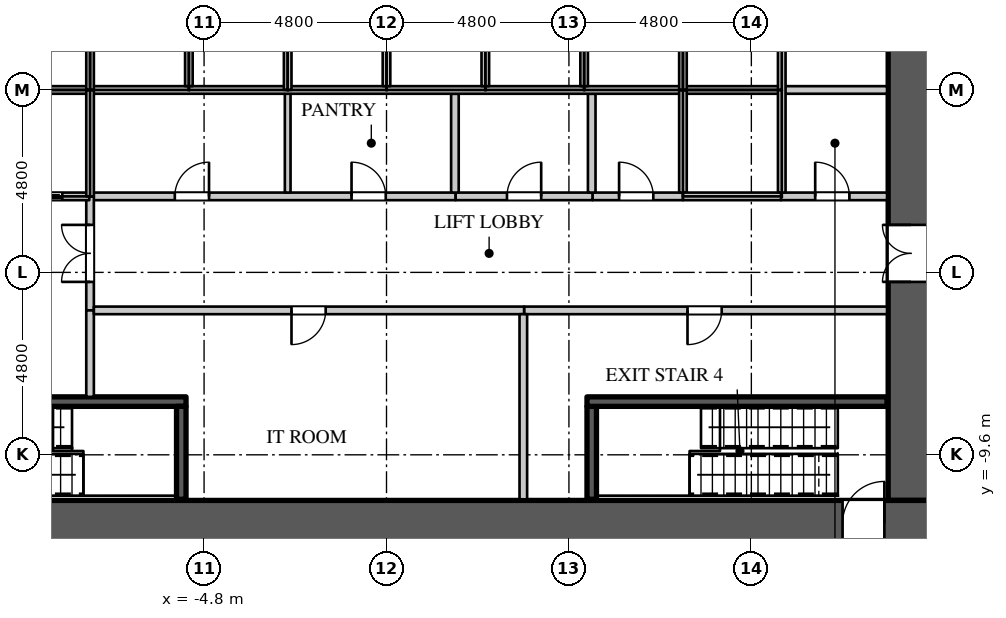
"""IFC4 building model, lengths in metres.
Left out: names, types, materials, properties, quantities, classifications, styles, units other than length and angle.
Written with IfcOpenShell. Run it as: python <this file> out.ifc"""

import sys

from ifc_helpers import new_model, si_unit, direction, frame, frame_2d, origin, place, context, subcontext, project, spatial, rectangle, extrude, element, fill, save


model = new_model("IFC4")
c1 = context("Model", 3, precision=1e-05, world=origin(), true_north=direction((0.0, 1.0)))
c2 = subcontext(c1, "Body", "Model", "MODEL_VIEW")
j1 = project(units=[si_unit("LENGTHUNIT", "METRE"), si_unit("PLANEANGLEUNIT", "RADIAN")], contexts=[c1])
p1 = place(None, origin())
s1 = spatial("IfcSite", under=j1, at=p1, CompositionType="ELEMENT")
p2 = place(p1, origin())
s2 = spatial("IfcBuilding", under=s1, at=p2, CompositionType="ELEMENT")
p3 = place(p2, frame((0.0, 0.0, 21.0)))
s3 = spatial("IfcBuildingStorey", under=s2, at=p3, CompositionType="ELEMENT", Elevation=21.0)
p4 = place(p3, frame((-14.4, -11.4, 0.0), z_axis=(0.0, 0.0, 1.0), x_axis=(1.0, 0.0, 0.0)))
e1 = element("IfcWall", 1, at=p4, inside=s3, PredefinedType="SHEAR", context=c2, shape_type="SweptSolid", body=[
    extrude(rectangle(XDim=28.8, YDim=1.2, at=frame_2d((14.4, 0.0))), origin(), (0.0, 0.0, 1.0), 4.5),
])
p5 = place(p4, frame((1.3, 0.0, 0.0)))
e2 = element("IfcOpeningElement", 2, at=p5, cuts=e1, PredefinedType="OPENING", context=c2, shape_type="SweptSolid", body=[
    extrude(rectangle(XDim=1.1, YDim=2.2, at=frame_2d((0.55, 1.1))), frame((0.0, 0.61, 0.0), z_axis=(0.0, -1.0, 0.0), x_axis=(1.0, 0.0, 0.0)), (0.0, 0.0, 1.0), 1.22),
])
p6 = place(p4, frame((26.4, 0.0, 0.0)))
e3 = element("IfcOpeningElement", 3, at=p6, cuts=e1, PredefinedType="OPENING", context=c2, shape_type="SweptSolid", body=[
    extrude(rectangle(XDim=1.1, YDim=2.2, at=frame_2d((0.55, 1.1))), frame((0.0, 0.61, 0.0), z_axis=(0.0, -1.0, 0.0), x_axis=(1.0, 0.0, 0.0)), (0.0, 0.0, 1.0), 1.22),
])
p7 = place(p3, frame((13.8, -10.8, 0.0), z_axis=(0.0, 0.0, 1.0), x_axis=(0.0, 1.0, 0.0)))
e4 = element("IfcWall", 4, at=p7, inside=s3, PredefinedType="SHEAR", context=c2, shape_type="SweptSolid", body=[
    extrude(rectangle(XDim=21.6, YDim=1.2, at=frame_2d((10.8, 0.0))), origin(), (0.0, 0.0, 1.0), 4.5),
])
p8 = place(p7, frame((14.35, 0.0, 0.0)))
e5 = element("IfcOpeningElement", 5, at=p8, cuts=e4, PredefinedType="OPENING", context=c2, shape_type="SweptSolid", body=[
    extrude(rectangle(XDim=1.5, YDim=2.4, at=frame_2d((0.75, 1.2))), frame((0.0, 0.61, 0.0), z_axis=(0.0, -1.0, 0.0), x_axis=(1.0, 0.0, 0.0)), (0.0, 0.0, 1.0), 1.22),
])
p9 = place(p7, frame((5.75, 0.0, 0.0)))
e6 = element("IfcOpeningElement", 6, at=p9, cuts=e4, PredefinedType="OPENING", context=c2, shape_type="SweptSolid", body=[
    extrude(rectangle(XDim=1.5, YDim=2.4, at=frame_2d((0.75, 1.2))), frame((0.0, 0.61, 0.0), z_axis=(0.0, -1.0, 0.0), x_axis=(1.0, 0.0, 0.0)), (0.0, 0.0, 1.0), 1.22),
])
p10 = place(p3, frame((-7.82, -2.8, 0.0), z_axis=(0.0, 0.0, 1.0), x_axis=(1.0, 0.0, 0.0)))
e7 = element("IfcWall", 7, at=p10, inside=s3, PredefinedType="PARTITIONING", context=c2, shape_type="SweptSolid", body=[
    extrude(rectangle(XDim=9.64, YDim=0.2, at=frame_2d((4.82, 0.0))), origin(), (0.0, 0.0, 1.0), 4.25),
])
p11 = place(p10, frame((2.25, 0.0, 0.0)))
e8 = element("IfcOpeningElement", 8, at=p11, cuts=e7, PredefinedType="OPENING", context=c2, shape_type="SweptSolid", body=[
    extrude(rectangle(XDim=0.9, YDim=2.2, at=frame_2d((0.45, 1.1))), frame((0.0, 0.11, 0.0), z_axis=(0.0, -1.0, 0.0), x_axis=(1.0, 0.0, 0.0)), (0.0, 0.0, 1.0), 0.22),
])
p12 = place(p10, frame((6.9, 0.0, 0.0)))
e9 = element("IfcOpeningElement", 9, at=p12, cuts=e7, PredefinedType="OPENING", context=c2, shape_type="SweptSolid", body=[
    extrude(rectangle(XDim=0.9, YDim=2.2, at=frame_2d((0.45, 1.1))), frame((0.0, 0.11, 0.0), z_axis=(0.0, -1.0, 0.0), x_axis=(1.0, 0.0, 0.0)), (0.0, 0.0, 1.0), 0.22),
])
p13 = place(p3, frame((-7.8, -5.8, 0.0), z_axis=(0.0, 0.0, 1.0), x_axis=(0.0, 1.0, 0.0)))
e10 = element("IfcWall", 10, at=p13, inside=s3, PredefinedType="PARTITIONING", context=c2, shape_type="SweptSolid", body=[
    extrude(rectangle(XDim=3.0, YDim=0.2, at=frame_2d((1.5, 0.0))), origin(), (0.0, 0.0, 1.0), 4.25),
])
p14 = place(p13, frame((0.75, 0.0, 0.0)))
e11 = element("IfcOpeningElement", 11, at=p14, cuts=e10, PredefinedType="OPENING", context=c2, shape_type="SweptSolid", body=[
    extrude(rectangle(XDim=1.5, YDim=2.4, at=frame_2d((0.75, 1.2))), frame((0.0, 0.11, 0.0), z_axis=(0.0, -1.0, 0.0), x_axis=(1.0, 0.0, 0.0)), (0.0, 0.0, 1.0), 0.22),
])
p15 = place(p3, frame((3.62, -5.8, 0.0), z_axis=(0.0, 0.0, 1.0), x_axis=(1.0, 0.0, 0.0)))
e12 = element("IfcWall", 12, at=p15, inside=s3, PredefinedType="PARTITIONING", context=c2, shape_type="SweptSolid", body=[
    extrude(rectangle(XDim=9.55, YDim=0.2, at=frame_2d((4.775, 0.0))), origin(), (0.0, 0.0, 1.0), 4.25),
])
p16 = place(p15, frame((4.3, 0.0, 0.0)))
e13 = element("IfcOpeningElement", 13, at=p16, cuts=e12, PredefinedType="OPENING", context=c2, shape_type="SweptSolid", body=[
    extrude(rectangle(XDim=0.9, YDim=2.2, at=frame_2d((0.45, 1.1))), frame((0.0, 0.11, 0.0), z_axis=(0.0, -1.0, 0.0), x_axis=(1.0, 0.0, 0.0)), (0.0, 0.0, 1.0), 0.22),
])
p17 = place(p3, frame((5.42, -2.8, 0.0), z_axis=(0.0, 0.0, 1.0), x_axis=(1.0, 0.0, 0.0)))
e14 = element("IfcWall", 14, at=p17, inside=s3, PredefinedType="PARTITIONING", context=c2, shape_type="SweptSolid", body=[
    extrude(rectangle(XDim=2.38, YDim=0.2, at=frame_2d((1.19, 0.0))), origin(), (0.0, 0.0, 1.0), 4.25),
])
p18 = place(p17, frame((0.7, 0.0, 0.0)))
e15 = element("IfcOpeningElement", 15, at=p18, cuts=e14, PredefinedType="OPENING", context=c2, shape_type="SweptSolid", body=[
    extrude(rectangle(XDim=0.9, YDim=2.2, at=frame_2d((0.45, 1.1))), frame((0.0, 0.11, 0.0), z_axis=(0.0, -1.0, 0.0), x_axis=(1.0, 0.0, 0.0)), (0.0, 0.0, 1.0), 0.22),
])
p19 = place(p3, frame((-2.6, -2.7, 0.0), z_axis=(0.0, 0.0, 1.0), x_axis=(0.0, 1.0, 0.0)))
e16 = element("IfcWall", 16, at=p19, inside=s3, PredefinedType="PARTITIONING", context=c2, shape_type="SweptSolid", body=[
    extrude(rectangle(XDim=2.7, YDim=0.15, at=frame_2d((1.35, 0.0))), origin(), (0.0, 0.0, 1.0), 4.25),
])
p20 = place(p3, frame((-7.8, -8.075, 0.0), z_axis=(0.0, 0.0, 1.0), x_axis=(0.0, 1.0, 0.0)))
e17 = element("IfcWall", 17, at=p20, inside=s3, PredefinedType="PARTITIONING", context=c2, shape_type="SweptSolid", body=[
    extrude(rectangle(XDim=2.275, YDim=0.2, at=frame_2d((1.137, 0.0))), origin(), (0.0, 0.0, 1.0), 4.25),
])
p21 = place(p3, frame((-7.7, -5.8, 0.0), z_axis=(0.0, 0.0, 1.0), x_axis=(1.0, 0.0, 0.0)))
e18 = element("IfcWall", 18, at=p21, inside=s3, PredefinedType="PARTITIONING", context=c2, shape_type="SweptSolid", body=[
    extrude(rectangle(XDim=11.32, YDim=0.2, at=frame_2d((5.66, 0.0))), origin(), (0.0, 0.0, 1.0), 4.25),
])
p22 = place(p21, frame((5.2, 0.0, 0.0)))
e19 = element("IfcOpeningElement", 19, at=p22, cuts=e18, PredefinedType="OPENING", context=c2, shape_type="SweptSolid", body=[
    extrude(rectangle(XDim=0.9, YDim=2.2, at=frame_2d((0.45, 1.1))), frame((0.0, 0.11, 0.0), z_axis=(0.0, -1.0, 0.0), x_axis=(1.0, 0.0, 0.0)), (0.0, 0.0, 1.0), 0.22),
])
p23 = place(p3, frame((1.82, -2.8, 0.0), z_axis=(0.0, 0.0, 1.0), x_axis=(1.0, 0.0, 0.0)))
e20 = element("IfcWall", 20, at=p23, inside=s3, PredefinedType="PARTITIONING", context=c2, shape_type="SweptSolid", body=[
    extrude(rectangle(XDim=3.6, YDim=0.2, at=frame_2d((1.8, 0.0))), origin(), (0.0, 0.0, 1.0), 4.25),
])
p24 = place(p23, frame((1.35, 0.0, 0.0)))
e21 = element("IfcOpeningElement", 21, at=p24, cuts=e20, PredefinedType="OPENING", context=c2, shape_type="SweptSolid", body=[
    extrude(rectangle(XDim=0.9, YDim=2.2, at=frame_2d((0.45, 1.1))), frame((0.0, 0.11, 0.0), z_axis=(0.0, -1.0, 0.0), x_axis=(1.0, 0.0, 0.0)), (0.0, 0.0, 1.0), 0.22),
])
p25 = place(p3, frame((1.8, -2.7, 0.0), z_axis=(0.0, 0.0, 1.0), x_axis=(0.0, 1.0, 0.0)))
e22 = element("IfcWall", 22, at=p25, inside=s3, PredefinedType="PARTITIONING", context=c2, shape_type="SweptSolid", body=[
    extrude(rectangle(XDim=2.6, YDim=0.2, at=frame_2d((1.3, 0.0))), origin(), (0.0, 0.0, 1.0), 4.25),
])
p26 = place(p3, frame((3.6, -10.77, 0.0), z_axis=(0.0, 0.0, 1.0), x_axis=(0.0, 1.0, 0.0)))
e23 = element("IfcWall", 23, at=p26, inside=s3, PredefinedType="PARTITIONING", context=c2, shape_type="SweptSolid", body=[
    extrude(rectangle(XDim=4.87, YDim=0.2, at=frame_2d((2.435, 0.0))), origin(), (0.0, 0.0, 1.0), 4.25),
])
p27 = place(p3, frame((5.4, -2.7, 0.0), z_axis=(0.0, 0.0, 1.0), x_axis=(0.0, 1.0, 0.0)))
e24 = element("IfcWall", 24, at=p27, inside=s3, PredefinedType="PARTITIONING", context=c2, shape_type="SweptSolid", body=[
    extrude(rectangle(XDim=2.6, YDim=0.2, at=frame_2d((1.3, 0.0))), origin(), (0.0, 0.0, 1.0), 4.25),
])
p28 = place(p3, frame((10.38, -2.8, 0.0), z_axis=(0.0, 0.0, 1.0), x_axis=(1.0, 0.0, 0.0)))
e25 = element("IfcWall", 25, at=p28, inside=s3, PredefinedType="PARTITIONING", context=c2, shape_type="SweptSolid", body=[
    extrude(rectangle(XDim=2.79, YDim=0.2, at=frame_2d((1.395, 0.0))), origin(), (0.0, 0.0, 1.0), 4.25),
])
p29 = place(p28, frame((0.9, 0.0, 0.0)))
e26 = element("IfcOpeningElement", 26, at=p29, cuts=e25, PredefinedType="OPENING", context=c2, shape_type="SweptSolid", body=[
    extrude(rectangle(XDim=0.9, YDim=2.2, at=frame_2d((0.45, 1.1))), frame((0.0, 0.11, 0.0), z_axis=(0.0, -1.0, 0.0), x_axis=(1.0, 0.0, 0.0)), (0.0, 0.0, 1.0), 0.22),
])
p30 = place(p3, frame((10.4, 0.0, 0.0), z_axis=(0.0, 0.0, 1.0), x_axis=(1.0, 0.0, 0.0)))
e27 = element("IfcWall", 27, at=p30, inside=s3, PredefinedType="PARTITIONING", context=c2, shape_type="SweptSolid", body=[
    extrude(rectangle(XDim=2.77, YDim=0.2, at=frame_2d((1.385, 0.0))), origin(), (0.0, 0.0, 1.0), 4.25),
])
p31 = place(p3, frame((-13.17, 0.0, 0.0), z_axis=(0.0, 0.0, 1.0), x_axis=(1.0, 0.0, 0.0)))
e28 = element("IfcWall", 28, at=p31, inside=s3, PredefinedType="PARTITIONING", context=c2, shape_type="SweptSolid", body=[
    extrude(rectangle(XDim=23.57, YDim=0.2, at=frame_2d((11.785, 0.0))), origin(), (0.0, 0.0, 1.0), 4.25),
])
p32 = place(p3, frame((-10.38, -2.8, 0.0), z_axis=(0.0, 0.0, 1.0), x_axis=(1.0, 0.0, 0.0)))
e29 = element("IfcWall", 29, at=p32, inside=s3, PredefinedType="PARTITIONING", context=c2, shape_type="SweptSolid", body=[
    extrude(rectangle(XDim=2.56, YDim=0.2, at=frame_2d((1.28, 0.0))), origin(), (0.0, 0.0, 1.0), 4.25),
])
p33 = place(p32, frame((0.75, 0.0, 0.0)))
e30 = element("IfcOpeningElement", 30, at=p33, cuts=e29, PredefinedType="OPENING", context=c2, shape_type="SweptSolid", body=[
    extrude(rectangle(XDim=1.1, YDim=2.2, at=frame_2d((0.55, 1.1))), frame((0.0, 0.11, 0.0), z_axis=(0.0, -1.0, 0.0), x_axis=(1.0, 0.0, 0.0)), (0.0, 0.0, 1.0), 0.22),
])
for number, where, z_axis, x_axis in (
    (31, (-7.8, -2.8, 0.0), (0.0, 0.0, 1.0), (0.0, 1.0, 0.0)),
    (32, (-7.8, 0.0, 0.0), (0.0, 0.0, 1.0), (0.0, 1.0, 0.0)),
):
    element("IfcWall", number, at=place(p3, frame(where, z_axis=z_axis, x_axis=x_axis)), inside=s3, PredefinedType="PARTITIONING", context=c2, shape_type="SweptSolid", body=[
        extrude(rectangle(XDim=2.8, YDim=0.2, at=frame_2d((1.4, 0.0))), origin(), (0.0, 0.0, 1.0), 4.25),
    ])
p34 = place(p3, frame((-5.2, 0.1, 0.0), z_axis=(0.0, 0.0, 1.0), x_axis=(0.0, 1.0, 0.0)))
e33 = element("IfcWall", 33, at=p34, inside=s3, PredefinedType="PARTITIONING", context=c2, shape_type="SweptSolid", body=[
    extrude(rectangle(XDim=2.6, YDim=0.2, at=frame_2d((1.3, 0.0))), origin(), (0.0, 0.0, 1.0), 4.25),
])
p35 = place(p3, frame((-2.6, 0.0, 0.0), z_axis=(0.0, 0.0, 1.0), x_axis=(0.0, 1.0, 0.0)))
e34 = element("IfcWall", 34, at=p35, inside=s3, PredefinedType="PARTITIONING", context=c2, shape_type="SweptSolid", body=[
    extrude(rectangle(XDim=2.7, YDim=0.2, at=frame_2d((1.35, 0.0))), origin(), (0.0, 0.0, 1.0), 4.25),
])
for number, where, z_axis, x_axis in (
    (35, (0.0, 0.1, 0.0), (0.0, 0.0, 1.0), (0.0, 1.0, 0.0)),
    (36, (2.6, 0.1, 0.0), (0.0, 0.0, 1.0), (0.0, 1.0, 0.0)),
    (37, (5.2, 0.1, 0.0), (0.0, 0.0, 1.0), (0.0, 1.0, 0.0)),
):
    element("IfcWall", number, at=place(p3, frame(where, z_axis=z_axis, x_axis=x_axis)), inside=s3, PredefinedType="PARTITIONING", context=c2, shape_type="SweptSolid", body=[
        extrude(rectangle(XDim=2.6, YDim=0.2, at=frame_2d((1.3, 0.0))), origin(), (0.0, 0.0, 1.0), 4.25),
    ])
p36 = place(p3, frame((7.8, -2.7, 0.0), z_axis=(0.0, 0.0, 1.0), x_axis=(0.0, 1.0, 0.0)))
e38 = element("IfcWall", 38, at=p36, inside=s3, PredefinedType="PARTITIONING", context=c2, shape_type="SweptSolid", body=[
    extrude(rectangle(XDim=2.7, YDim=0.2, at=frame_2d((1.35, 0.0))), origin(), (0.0, 0.0, 1.0), 4.25),
])
p37 = place(p3, frame((7.8, -2.8, 0.0), z_axis=(0.0, 0.0, 1.0), x_axis=(1.0, 0.0, 0.0)))
e39 = element("IfcWall", 39, at=p37, inside=s3, PredefinedType="PARTITIONING", context=c2, shape_type="SweptSolid", body=[
    extrude(rectangle(XDim=2.58, YDim=0.2, at=frame_2d((1.29, 0.0))), origin(), (0.0, 0.0, 1.0), 4.25),
])
p38 = place(p3, frame((7.8, 0.0, 0.0), z_axis=(0.0, 0.0, 1.0), x_axis=(0.0, 1.0, 0.0)))
e40 = element("IfcWall", 40, at=p38, inside=s3, PredefinedType="PARTITIONING", context=c2, shape_type="SweptSolid", body=[
    extrude(rectangle(XDim=2.7, YDim=0.2, at=frame_2d((1.35, 0.0))), origin(), (0.0, 0.0, 1.0), 4.25),
])
p39 = place(p3, frame((10.4, -2.7, 0.0), z_axis=(0.0, 0.0, 1.0), x_axis=(0.0, 1.0, 0.0)))
e41 = element("IfcWall", 41, at=p39, inside=s3, PredefinedType="PARTITIONING", context=c2, shape_type="SweptSolid", body=[
    extrude(rectangle(XDim=5.4, YDim=0.2, at=frame_2d((2.7, 0.0))), origin(), (0.0, 0.0, 1.0), 4.25),
])
p40 = place(p3, frame((-13.17, -8.2, 0.0), z_axis=(0.0, 0.0, 1.0), x_axis=(1.0, 0.0, 0.0)))
e42 = element("IfcWall", 42, at=p40, inside=s3, PredefinedType="SHEAR", context=c2, shape_type="SweptSolid", body=[
    extrude(rectangle(XDim=7.895, YDim=0.25, at=frame_2d((3.948, 0.0))), origin(), (0.0, 0.0, 1.0), 4.25),
])
p41 = place(p40, frame((0.15, 0.0, 0.0)))
e43 = element("IfcOpeningElement", 43, at=p41, cuts=e42, PredefinedType="OPENING", context=c2, shape_type="SweptSolid", body=[
    extrude(rectangle(XDim=1.1, YDim=2.2, at=frame_2d((0.55, 1.1))), frame((0.0, 0.135, 0.0), z_axis=(0.0, -1.0, 0.0), x_axis=(1.0, 0.0, 0.0)), (0.0, 0.0, 1.0), 0.27),
])
for number, where, z_axis, x_axis in (
    (44, (-5.4, -10.77, 0.0), (0.0, 0.0, 1.0), (0.0, 1.0, 0.0)),
    (45, (5.4, -10.77, 0.0), (0.0, 0.0, 1.0), (0.0, 1.0, 0.0)),
):
    element("IfcWall", number, at=place(p3, frame(where, z_axis=z_axis, x_axis=x_axis)), inside=s3, PredefinedType="SHEAR", context=c2, shape_type="SweptSolid", body=[
        extrude(rectangle(XDim=2.445, YDim=0.25, at=frame_2d((1.223, 0.0))), origin(), (0.0, 0.0, 1.0), 4.25),
    ])
p42 = place(p3, frame((5.275, -8.2, 0.0), z_axis=(0.0, 0.0, 1.0), x_axis=(1.0, 0.0, 0.0)))
e46 = element("IfcWall", 46, at=p42, inside=s3, PredefinedType="SHEAR", context=c2, shape_type="SweptSolid", body=[
    extrude(rectangle(XDim=7.895, YDim=0.25, at=frame_2d((3.948, 0.0))), origin(), (0.0, 0.0, 1.0), 4.25),
])
p43 = place(p29, origin())
e47 = element("IfcDoor", 47, at=p43, inside=s3, OperationType="SINGLE_SWING_LEFT", PredefinedType="DOOR", context=c2, shape_type="SweptSolid", body=[
    extrude(rectangle(XDim=0.9, YDim=2.2, at=frame_2d((0.45, 1.1))), frame((0.0, 0.025, 0.0), z_axis=(0.0, -1.0, 0.0), x_axis=(1.0, 0.0, 0.0)), (0.0, 0.0, 1.0), 0.05),
])
fill(e26, e47)
p44 = place(p22, origin())
e48 = element("IfcDoor", 48, at=p44, inside=s3, OperationType="SINGLE_SWING_RIGHT", PredefinedType="DOOR", context=c2, shape_type="SweptSolid", body=[
    extrude(rectangle(XDim=0.9, YDim=2.2, at=frame_2d((0.45, 1.1))), frame((0.0, 0.025, 0.0), z_axis=(0.0, -1.0, 0.0), x_axis=(1.0, 0.0, 0.0)), (0.0, 0.0, 1.0), 0.05),
])
fill(e19, e48)
p45 = place(p16, origin())
e49 = element("IfcDoor", 49, at=p45, inside=s3, OperationType="SINGLE_SWING_RIGHT", PredefinedType="DOOR", context=c2, shape_type="SweptSolid", body=[
    extrude(rectangle(XDim=0.9, YDim=2.2, at=frame_2d((0.45, 1.1))), frame((0.0, 0.025, 0.0), z_axis=(0.0, -1.0, 0.0), x_axis=(1.0, 0.0, 0.0)), (0.0, 0.0, 1.0), 0.05),
])
fill(e13, e49)
p46 = place(p11, origin())
e50 = element("IfcDoor", 50, at=p46, inside=s3, OperationType="SINGLE_SWING_RIGHT", PredefinedType="DOOR", context=c2, shape_type="SweptSolid", body=[
    extrude(rectangle(XDim=0.9, YDim=2.2, at=frame_2d((0.45, 1.1))), frame((0.0, 0.025, 0.0), z_axis=(0.0, -1.0, 0.0), x_axis=(1.0, 0.0, 0.0)), (0.0, 0.0, 1.0), 0.05),
])
fill(e8, e50)
p47 = place(p12, origin())
e51 = element("IfcDoor", 51, at=p47, inside=s3, OperationType="SINGLE_SWING_LEFT", PredefinedType="DOOR", context=c2, shape_type="SweptSolid", body=[
    extrude(rectangle(XDim=0.9, YDim=2.2, at=frame_2d((0.45, 1.1))), frame((0.0, 0.025, 0.0), z_axis=(0.0, -1.0, 0.0), x_axis=(1.0, 0.0, 0.0)), (0.0, 0.0, 1.0), 0.05),
])
fill(e9, e51)
p48 = place(p24, origin())
e52 = element("IfcDoor", 52, at=p48, inside=s3, OperationType="SINGLE_SWING_RIGHT", PredefinedType="DOOR", context=c2, shape_type="SweptSolid", body=[
    extrude(rectangle(XDim=0.9, YDim=2.2, at=frame_2d((0.45, 1.1))), frame((0.0, 0.025, 0.0), z_axis=(0.0, -1.0, 0.0), x_axis=(1.0, 0.0, 0.0)), (0.0, 0.0, 1.0), 0.05),
])
fill(e21, e52)
p49 = place(p18, origin())
e53 = element("IfcDoor", 53, at=p49, inside=s3, OperationType="SINGLE_SWING_LEFT", PredefinedType="DOOR", context=c2, shape_type="SweptSolid", body=[
    extrude(rectangle(XDim=0.9, YDim=2.2, at=frame_2d((0.45, 1.1))), frame((0.0, 0.025, 0.0), z_axis=(0.0, -1.0, 0.0), x_axis=(1.0, 0.0, 0.0)), (0.0, 0.0, 1.0), 0.05),
])
fill(e15, e53)
p50 = place(p33, origin())
e54 = element("IfcDoor", 54, at=p50, inside=s3, OperationType="DOUBLE_DOOR_SLIDING", PredefinedType="DOOR", context=c2, shape_type="SweptSolid", body=[
    extrude(rectangle(XDim=1.1, YDim=2.2, at=frame_2d((0.55, 1.1))), frame((0.0, 0.025, 0.0), z_axis=(0.0, -1.0, 0.0), x_axis=(1.0, 0.0, 0.0)), (0.0, 0.0, 1.0), 0.05),
])
fill(e30, e54)
p51 = place(p14, origin())
e55 = element("IfcDoor", 55, at=p51, inside=s3, OperationType="DOUBLE_DOOR_SINGLE_SWING", PredefinedType="DOOR", context=c2, shape_type="SweptSolid", body=[
    extrude(rectangle(XDim=1.5, YDim=2.4, at=frame_2d((0.75, 1.2))), frame((0.0, 0.025, 0.0), z_axis=(0.0, -1.0, 0.0), x_axis=(1.0, 0.0, 0.0)), (0.0, 0.0, 1.0), 0.05),
])
fill(e11, e55)
p52 = place(p9, origin())
e56 = element("IfcDoor", 56, at=p52, inside=s3, OperationType="DOUBLE_DOOR_SINGLE_SWING", PredefinedType="DOOR", context=c2, shape_type="SweptSolid", body=[
    extrude(rectangle(XDim=1.5, YDim=2.4, at=frame_2d((0.75, 1.2))), frame((0.0, 0.025, 0.0), z_axis=(0.0, -1.0, 0.0), x_axis=(1.0, 0.0, 0.0)), (0.0, 0.0, 1.0), 0.05),
])
fill(e6, e56)
p53 = place(p6, origin())
e57 = element("IfcDoor", 57, at=p53, inside=s3, OperationType="SINGLE_SWING_RIGHT", PredefinedType="DOOR", context=c2, shape_type="SweptSolid", body=[
    extrude(rectangle(XDim=1.1, YDim=2.2, at=frame_2d((0.55, 1.1))), frame((0.0, 0.025, 0.0), z_axis=(0.0, -1.0, 0.0), x_axis=(1.0, 0.0, 0.0)), (0.0, 0.0, 1.0), 0.05),
])
fill(e3, e57)
save(model, sys.argv[1])
